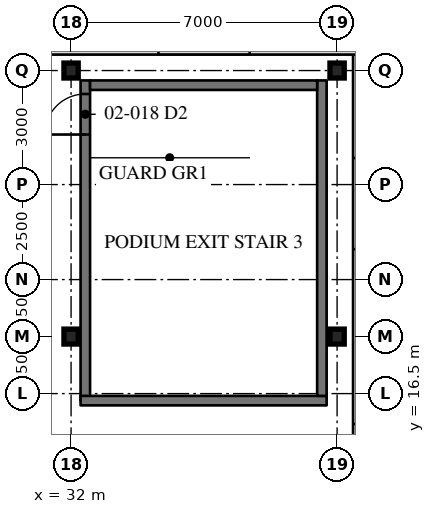
"""IFC4 building model, lengths in metres.
Left out: names, types, materials, properties, quantities, classifications, styles, units other than length and angle.
Written with IfcOpenShell. Run it as: python <this file> out.ifc"""

import sys

from ifc_helpers import new_model, si_unit, direction, frame, frame_2d, origin, origin_2d, place, context, subcontext, project, spatial, rectangle, i_section, extrude, element, fill, save


model = new_model("IFC4")
c1 = context("Model", 3, precision=1e-05, world=origin(), true_north=direction((0.0, 1.0)))
c2 = subcontext(c1, "Body", "Model", "MODEL_VIEW")
j1 = project(units=[si_unit("LENGTHUNIT", "METRE"), si_unit("PLANEANGLEUNIT", "RADIAN")], contexts=[c1])
p1 = place(None, origin())
s1 = spatial("IfcSite", under=j1, at=p1, CompositionType="ELEMENT")
p2 = place(p1, origin())
s2 = spatial("IfcBuilding", under=s1, at=p2, CompositionType="ELEMENT")
p3 = place(p2, frame((0.0, 0.0, 11.0)))
s3 = spatial("IfcBuildingStorey", under=s2, at=p3, CompositionType="ELEMENT", Elevation=11.0)
for number, where, z_axis, x_axis in (
    (1, (32.0, 18.0, 0.0), (0.0, 0.0, 1.0), (0.0, 1.0, 0.0)),
    (2, (32.0, 25.0, 0.0), (0.0, 0.0, 1.0), (0.0, 1.0, 0.0)),
    (3, (39.0, 18.0, 0.0), (0.0, 0.0, 1.0), (0.0, 1.0, 0.0)),
    (4, (39.0, 25.0, 0.0), (0.0, 0.0, 1.0), (0.0, 1.0, 0.0)),
):
    element("IfcColumn", number, at=place(p3, frame(where, z_axis=z_axis, x_axis=x_axis)), inside=s3, PredefinedType="COLUMN", context=c2, shape_type="SweptSolid", body=[
        extrude(i_section(OverallWidth=0.394, OverallDepth=0.376, WebThickness=0.017, FlangeThickness=0.028, at=origin_2d()), origin(), (0.0, 0.0, 1.0), 5.0),
    ])
p4 = place(p3, frame((39.62, -25.42, -0.19), z_axis=(0.0, 0.0, 1.0), x_axis=(0.0, 1.0, 0.0)))
e5 = element("IfcWall", 5, at=p4, inside=s3, PredefinedType="SOLIDWALL", context=c2, shape_type="SweptSolid", body=[
    extrude(rectangle(XDim=50.84, YDim=0.4, at=frame_2d((25.42, 0.0))), origin(), (0.0, 0.0, 1.0), 5.0),
])
p5 = place(p4, frame((2.72, 0.0, 1.09)))
e6 = element("IfcOpeningElement", 6, at=p5, cuts=e5, PredefinedType="OPENING", context=c2, shape_type="SweptSolid", body=[
    extrude(rectangle(XDim=2.4, YDim=2.7, at=frame_2d((1.2, 1.35))), frame((0.0, 0.21, 0.0), z_axis=(0.0, -1.0, 0.0), x_axis=(1.0, 0.0, 0.0)), (0.0, 0.0, 1.0), 0.42),
])
p6 = place(p4, frame((9.72, 0.0, 1.09)))
e7 = element("IfcOpeningElement", 7, at=p6, cuts=e5, PredefinedType="OPENING", context=c2, shape_type="SweptSolid", body=[
    extrude(rectangle(XDim=2.4, YDim=2.7, at=frame_2d((1.2, 1.35))), frame((0.0, 0.21, 0.0), z_axis=(0.0, -1.0, 0.0), x_axis=(1.0, 0.0, 0.0)), (0.0, 0.0, 1.0), 0.42),
])
p7 = place(p4, frame((18.72, 0.0, 1.09)))
e8 = element("IfcOpeningElement", 8, at=p7, cuts=e5, PredefinedType="OPENING", context=c2, shape_type="SweptSolid", body=[
    extrude(rectangle(XDim=2.4, YDim=2.7, at=frame_2d((1.2, 1.35))), frame((0.0, 0.21, 0.0), z_axis=(0.0, -1.0, 0.0), x_axis=(1.0, 0.0, 0.0)), (0.0, 0.0, 1.0), 0.42),
])
p8 = place(p4, frame((29.72, 0.0, 1.09)))
e9 = element("IfcOpeningElement", 9, at=p8, cuts=e5, PredefinedType="OPENING", context=c2, shape_type="SweptSolid", body=[
    extrude(rectangle(XDim=2.4, YDim=2.7, at=frame_2d((1.2, 1.35))), frame((0.0, 0.21, 0.0), z_axis=(0.0, -1.0, 0.0), x_axis=(1.0, 0.0, 0.0)), (0.0, 0.0, 1.0), 0.42),
])
p9 = place(p4, frame((38.72, 0.0, 1.09)))
e10 = element("IfcOpeningElement", 10, at=p9, cuts=e5, PredefinedType="OPENING", context=c2, shape_type="SweptSolid", body=[
    extrude(rectangle(XDim=2.4, YDim=2.7, at=frame_2d((1.2, 1.35))), frame((0.0, 0.21, 0.0), z_axis=(0.0, -1.0, 0.0), x_axis=(1.0, 0.0, 0.0)), (0.0, 0.0, 1.0), 0.42),
])
p10 = place(p4, frame((45.72, 0.0, 1.09)))
e11 = element("IfcOpeningElement", 11, at=p10, cuts=e5, PredefinedType="OPENING", context=c2, shape_type="SweptSolid", body=[
    extrude(rectangle(XDim=2.4, YDim=2.7, at=frame_2d((1.2, 1.35))), frame((0.0, 0.21, 0.0), z_axis=(0.0, -1.0, 0.0), x_axis=(1.0, 0.0, 0.0)), (0.0, 0.0, 1.0), 0.42),
])
p11 = place(p3, frame((39.82, 25.62, -0.19), z_axis=(0.0, 0.0, 1.0), x_axis=(-1.0, 0.0, 0.0)))
e12 = element("IfcWall", 12, at=p11, inside=s3, PredefinedType="SOLIDWALL", context=c2, shape_type="SweptSolid", body=[
    extrude(rectangle(XDim=79.64, YDim=0.4, at=frame_2d((39.82, 0.0))), origin(), (0.0, 0.0, 1.0), 5.0),
])
p12 = place(p11, frame((74.12, 0.0, 1.09)))
e13 = element("IfcOpeningElement", 13, at=p12, cuts=e12, PredefinedType="OPENING", context=c2, shape_type="SweptSolid", body=[
    extrude(rectangle(XDim=2.4, YDim=2.7, at=frame_2d((1.2, 1.35))), frame((0.0, 0.21, 0.0), z_axis=(0.0, -1.0, 0.0), x_axis=(1.0, 0.0, 0.0)), (0.0, 0.0, 1.0), 0.42),
])
p13 = place(p11, frame((67.12, 0.0, 1.09)))
e14 = element("IfcOpeningElement", 14, at=p13, cuts=e12, PredefinedType="OPENING", context=c2, shape_type="SweptSolid", body=[
    extrude(rectangle(XDim=2.4, YDim=2.7, at=frame_2d((1.2, 1.35))), frame((0.0, 0.21, 0.0), z_axis=(0.0, -1.0, 0.0), x_axis=(1.0, 0.0, 0.0)), (0.0, 0.0, 1.0), 0.42),
])
p14 = place(p11, frame((60.12, 0.0, 1.09)))
e15 = element("IfcOpeningElement", 15, at=p14, cuts=e12, PredefinedType="OPENING", context=c2, shape_type="SweptSolid", body=[
    extrude(rectangle(XDim=2.4, YDim=2.7, at=frame_2d((1.2, 1.35))), frame((0.0, 0.21, 0.0), z_axis=(0.0, -1.0, 0.0), x_axis=(1.0, 0.0, 0.0)), (0.0, 0.0, 1.0), 0.42),
])
p15 = place(p11, frame((53.12, 0.0, 1.09)))
e16 = element("IfcOpeningElement", 16, at=p15, cuts=e12, PredefinedType="OPENING", context=c2, shape_type="SweptSolid", body=[
    extrude(rectangle(XDim=2.4, YDim=2.7, at=frame_2d((1.2, 1.35))), frame((0.0, 0.21, 0.0), z_axis=(0.0, -1.0, 0.0), x_axis=(1.0, 0.0, 0.0)), (0.0, 0.0, 1.0), 0.42),
])
p16 = place(p11, frame((44.12, 0.0, 1.09)))
e17 = element("IfcOpeningElement", 17, at=p16, cuts=e12, PredefinedType="OPENING", context=c2, shape_type="SweptSolid", body=[
    extrude(rectangle(XDim=2.4, YDim=2.7, at=frame_2d((1.2, 1.35))), frame((0.0, 0.21, 0.0), z_axis=(0.0, -1.0, 0.0), x_axis=(1.0, 0.0, 0.0)), (0.0, 0.0, 1.0), 0.42),
])
p17 = place(p11, frame((33.12, 0.0, 1.09)))
e18 = element("IfcOpeningElement", 18, at=p17, cuts=e12, PredefinedType="OPENING", context=c2, shape_type="SweptSolid", body=[
    extrude(rectangle(XDim=2.4, YDim=2.7, at=frame_2d((1.2, 1.35))), frame((0.0, 0.21, 0.0), z_axis=(0.0, -1.0, 0.0), x_axis=(1.0, 0.0, 0.0)), (0.0, 0.0, 1.0), 0.42),
])
p18 = place(p11, frame((24.12, 0.0, 1.09)))
e19 = element("IfcOpeningElement", 19, at=p18, cuts=e12, PredefinedType="OPENING", context=c2, shape_type="SweptSolid", body=[
    extrude(rectangle(XDim=2.4, YDim=2.7, at=frame_2d((1.2, 1.35))), frame((0.0, 0.21, 0.0), z_axis=(0.0, -1.0, 0.0), x_axis=(1.0, 0.0, 0.0)), (0.0, 0.0, 1.0), 0.42),
])
p19 = place(p11, frame((17.12, 0.0, 1.09)))
e20 = element("IfcOpeningElement", 20, at=p19, cuts=e12, PredefinedType="OPENING", context=c2, shape_type="SweptSolid", body=[
    extrude(rectangle(XDim=2.4, YDim=2.7, at=frame_2d((1.2, 1.35))), frame((0.0, 0.21, 0.0), z_axis=(0.0, -1.0, 0.0), x_axis=(1.0, 0.0, 0.0)), (0.0, 0.0, 1.0), 0.42),
])
p20 = place(p11, frame((10.12, 0.0, 1.09)))
e21 = element("IfcOpeningElement", 21, at=p20, cuts=e12, PredefinedType="OPENING", context=c2, shape_type="SweptSolid", body=[
    extrude(rectangle(XDim=2.4, YDim=2.7, at=frame_2d((1.2, 1.35))), frame((0.0, 0.21, 0.0), z_axis=(0.0, -1.0, 0.0), x_axis=(1.0, 0.0, 0.0)), (0.0, 0.0, 1.0), 0.42),
])
p21 = place(p11, frame((3.12, 0.0, 1.09)))
e22 = element("IfcOpeningElement", 22, at=p21, cuts=e12, PredefinedType="OPENING", context=c2, shape_type="SweptSolid", body=[
    extrude(rectangle(XDim=2.4, YDim=2.7, at=frame_2d((1.2, 1.35))), frame((0.0, 0.21, 0.0), z_axis=(0.0, -1.0, 0.0), x_axis=(1.0, 0.0, 0.0)), (0.0, 0.0, 1.0), 0.42),
])
p22 = place(p3, frame((32.375, 16.315, 0.0), z_axis=(0.0, 0.0, 1.0), x_axis=(0.0, 1.0, 0.0)))
e23 = element("IfcWall", 23, at=p22, inside=s3, PredefinedType="SOLIDWALL", context=c2, shape_type="SweptSolid", body=[
    extrude(rectangle(XDim=8.425, YDim=0.25, at=frame_2d((4.212, 0.0))), origin(), (0.0, 0.0, 1.0), 4.81),
])
p23 = place(p22, frame((7.001, 0.0, 0.0)))
e24 = element("IfcOpeningElement", 24, at=p23, cuts=e23, PredefinedType="OPENING", context=c2, shape_type="SweptSolid", body=[
    extrude(rectangle(XDim=1.067, YDim=2.134, at=frame_2d((0.533, 1.067))), frame((0.0, 0.135, 0.0), z_axis=(0.0, -1.0, 0.0), x_axis=(1.0, 0.0, 0.0)), (0.0, 0.0, 1.0), 0.27),
])
p24 = place(p3, frame((32.25, 16.315, 0.0), z_axis=(0.0, 0.0, 1.0), x_axis=(1.0, 0.0, 0.0)))
e25 = element("IfcWall", 25, at=p24, inside=s3, PredefinedType="SOLIDWALL", context=c2, shape_type="SweptSolid", body=[
    extrude(rectangle(XDim=6.475, YDim=0.25, at=frame_2d((3.238, 0.0))), origin(), (0.0, 0.0, 1.0), 4.81),
])
p25 = place(p3, frame((38.6, 16.44, 0.0), z_axis=(0.0, 0.0, 1.0), x_axis=(0.0, 1.0, 0.0)))
e26 = element("IfcWall", 26, at=p25, inside=s3, PredefinedType="SOLIDWALL", context=c2, shape_type="SweptSolid", body=[
    extrude(rectangle(XDim=8.3, YDim=0.25, at=frame_2d((4.15, 0.0))), origin(), (0.0, 0.0, 1.0), 4.81),
])
p26 = place(p3, frame((32.5, 24.615, 0.0), z_axis=(0.0, 0.0, 1.0), x_axis=(1.0, 0.0, 0.0)))
e27 = element("IfcWall", 27, at=p26, inside=s3, PredefinedType="SOLIDWALL", context=c2, shape_type="SweptSolid", body=[
    extrude(rectangle(XDim=5.975, YDim=0.25, at=frame_2d((2.988, 0.0))), origin(), (0.0, 0.0, 1.0), 4.81),
])
p27 = place(p23, origin())
e28 = element("IfcDoor", 28, at=p27, inside=s3, OperationType="SINGLE_SWING_LEFT", PredefinedType="DOOR", context=c2, shape_type="SweptSolid", body=[
    extrude(rectangle(XDim=1.067, YDim=2.134, at=frame_2d((0.533, 1.067))), frame((0.0, 0.025, 0.0), z_axis=(0.0, -1.0, 0.0), x_axis=(1.0, 0.0, 0.0)), (0.0, 0.0, 1.0), 0.05),
])
fill(e24, e28)
save(model, sys.argv[1])
